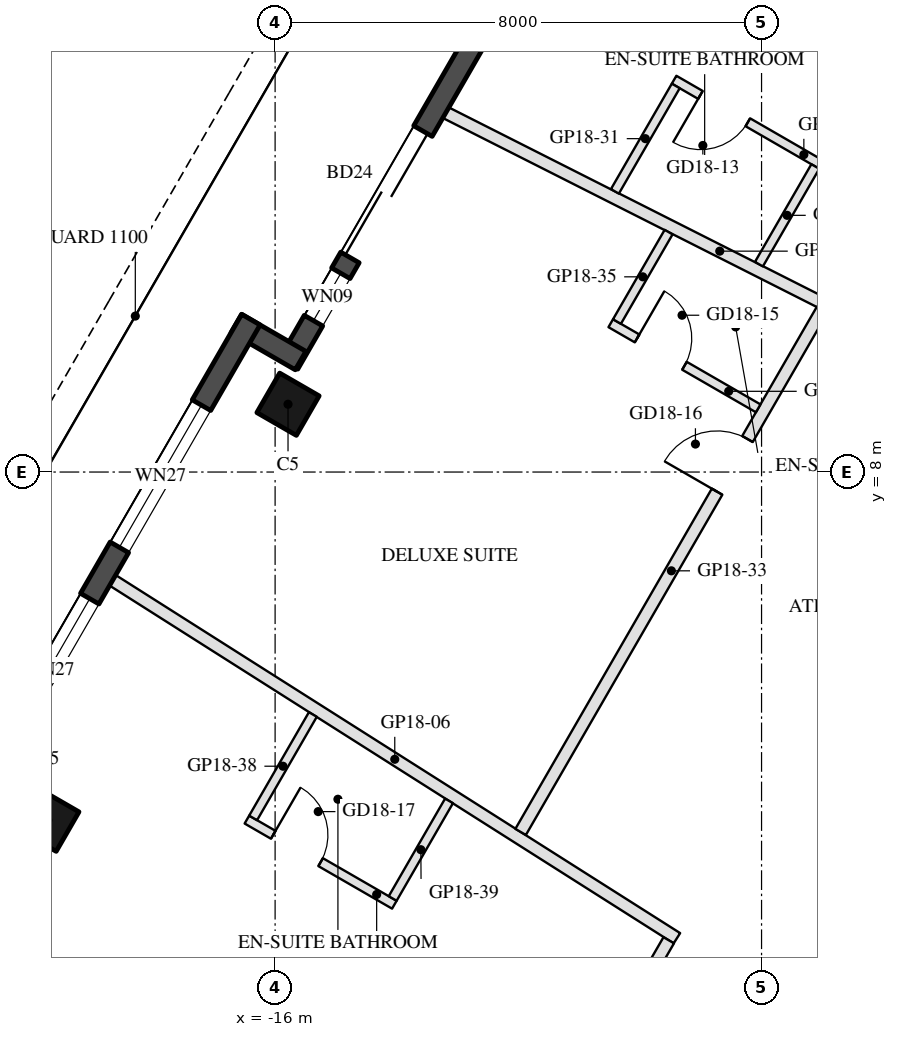
"""IFC4 building model, lengths in metres.
Left out: names, types, materials, properties, quantities, classifications, styles, units other than length and angle.
Written with IfcOpenShell. Run it as: python <this file> out.ifc"""

import sys

from ifc_helpers import new_model, si_unit, direction, frame, frame_2d, origin, origin_2d, place, context, subcontext, project, spatial, rectangle, hollow_rectangle, extrude, element, fill, save


model = new_model("IFC4")
c1 = context("Model", 3, precision=1e-05, world=origin(), true_north=direction((0.0, 1.0)))
c2 = subcontext(c1, "Body", "Model", "MODEL_VIEW")
j1 = project(units=[si_unit("LENGTHUNIT", "METRE"), si_unit("PLANEANGLEUNIT", "RADIAN")], contexts=[c1])
p1 = place(None, origin())
s1 = spatial("IfcSite", under=j1, at=p1, CompositionType="ELEMENT")
p2 = place(p1, origin())
s2 = spatial("IfcBuilding", under=s1, at=p2, CompositionType="ELEMENT")
p3 = place(p2, frame((0.0, 0.0, 194.7)))
s3 = spatial("IfcBuildingStorey", under=s2, at=p3, CompositionType="ELEMENT", Elevation=194.7)
for number, where, z_axis, x_axis in (
    (1, (-15.788, 9.115, 0.0), (0.0, 0.0, 1.0), (0.5, 0.866, 0.0)),
    (2, (-19.738, 2.273, 0.0), (0.0, 0.0, 1.0), (0.5, 0.866, 0.0)),
):
    element("IfcColumn", number, at=place(p3, frame(where, z_axis=z_axis, x_axis=x_axis)), inside=s3, PredefinedType="COLUMN", context=c2, shape_type="SweptSolid", body=[
        extrude(hollow_rectangle(XDim=0.75, YDim=0.75, WallThickness=0.035, at=origin_2d()), origin(), (0.0, 0.0, 1.0), 3.7),
    ])
p4 = place(p3, frame((-12.409, 15.617, 0.0), z_axis=(0.0, 0.0, 1.0), x_axis=(-0.500003597184, -0.866023326939, 0.0)))
e3 = element("IfcWall", 3, at=p4, inside=s3, PredefinedType="SOLIDWALL", context=c2, shape_type="SweptSolid", body=[
    extrude(rectangle(XDim=6.74, YDim=0.35, at=frame_2d((3.37, 0.0))), origin(), (0.0, 0.0, 1.0), 3.55),
])
p5 = place(p4, frame((2.32, 0.0, 0.0)))
e4 = element("IfcOpeningElement", 4, at=p5, cuts=e3, PredefinedType="OPENING", context=c2, shape_type="SweptSolid", body=[
    extrude(rectangle(XDim=2.4, YDim=2.4, at=frame_2d((1.2, 1.2))), frame((0.0, 0.185, 0.0), z_axis=(0.0, -1.0, 0.0), x_axis=(1.0, 0.0, 0.0)), (0.0, 0.0, 1.0), 0.37),
])
p6 = place(p4, frame((5.02, 0.0, 0.3)))
e5 = element("IfcOpeningElement", 5, at=p6, cuts=e3, PredefinedType="OPENING", context=c2, shape_type="SweptSolid", body=[
    extrude(rectangle(XDim=0.9, YDim=2.65, at=frame_2d((0.45, 1.325))), frame((0.0, 0.185, 0.0), z_axis=(0.0, -1.0, 0.0), x_axis=(1.0, 0.0, 0.0)), (0.0, 0.0, 1.0), 0.37),
])
p7 = place(p3, frame((-15.581, 9.833, 0.0), z_axis=(0.0, 0.0, 1.0), x_axis=(-0.866055662726, 0.499947586314, 0.0)))
e6 = element("IfcWall", 6, at=p7, inside=s3, PredefinedType="SOLIDWALL", context=c2, shape_type="SweptSolid", body=[
    extrude(rectangle(XDim=1.22, YDim=0.35, at=frame_2d((0.61, 0.0))), origin(), (0.0, 0.0, 1.0), 3.55),
])
p8 = place(p3, frame((-16.398, 10.507, 0.0), z_axis=(0.0, 0.0, 1.0), x_axis=(-0.499999142773, -0.866025898704, 0.0)))
e7 = element("IfcWall", 7, at=p8, inside=s3, PredefinedType="SOLIDWALL", context=c2, shape_type="SweptSolid", body=[
    extrude(rectangle(XDim=9.7, YDim=0.35, at=frame_2d((4.85, 0.0))), origin(), (0.0, 0.0, 1.0), 3.55),
])
p9 = place(p8, frame((1.625, 0.0, 0.3)))
e8 = element("IfcOpeningElement", 8, at=p9, cuts=e7, PredefinedType="OPENING", context=c2, shape_type="SweptSolid", body=[
    extrude(rectangle(XDim=2.7, YDim=2.65, at=frame_2d((1.35, 1.325))), frame((0.0, 0.185, 0.0), z_axis=(0.0, -1.0, 0.0), x_axis=(1.0, 0.0, 0.0)), (0.0, 0.0, 1.0), 0.37),
])
p10 = place(p8, frame((5.3, 0.0, 0.3)))
e9 = element("IfcOpeningElement", 9, at=p10, cuts=e7, PredefinedType="OPENING", context=c2, shape_type="SweptSolid", body=[
    extrude(rectangle(XDim=2.7, YDim=2.65, at=frame_2d((1.35, 1.325))), frame((0.0, 0.185, 0.0), z_axis=(0.0, -1.0, 0.0), x_axis=(1.0, 0.0, 0.0)), (0.0, 0.0, 1.0), 0.37),
])
p11 = place(p3, frame((-13.192, 13.91, 0.0), z_axis=(0.0, 0.0, 1.0), x_axis=(0.892469554868, -0.451107629766, 0.0)))
e10 = element("IfcWall", 10, at=p11, inside=s3, PredefinedType="PARTITIONING", context=c2, shape_type="SweptSolid", body=[
    extrude(rectangle(XDim=10.096, YDim=0.2, at=frame_2d((5.048, 0.0))), origin(), (0.0, 0.0, 1.0), 3.06),
])
p12 = place(p3, frame((-18.672, 6.219, 0.0), z_axis=(0.0, 0.0, 1.0), x_axis=(0.844423533478, -0.535676111198, 0.0)))
e11 = element("IfcWall", 11, at=p12, inside=s3, PredefinedType="PARTITIONING", context=c2, shape_type="SweptSolid", body=[
    extrude(rectangle(XDim=10.99, YDim=0.2, at=frame_2d((5.495, 0.0))), origin(), (0.0, 0.0, 1.0), 2.95),
])
p13 = place(p3, frame((-7.013, 13.052, 0.0), z_axis=(0.0, 0.0, 1.0), x_axis=(-0.866034573852, 0.49998411664, 0.0)))
e12 = element("IfcWall", 12, at=p13, inside=s3, PredefinedType="PARTITIONING", context=c2, shape_type="SweptSolid", body=[
    extrude(rectangle(XDim=2.8, YDim=0.15, at=frame_2d((1.4, 0.0))), origin(), (0.0, 0.0, 1.0), 2.95),
])
p14 = place(p13, frame((1.4, 0.0, 0.0)))
e13 = element("IfcOpeningElement", 13, at=p14, cuts=e12, PredefinedType="OPENING", context=c2, shape_type="SweptSolid", body=[
    extrude(rectangle(XDim=0.9, YDim=2.1, at=frame_2d((0.45, 1.05))), frame((0.0, 0.085, 0.0), z_axis=(0.0, -1.0, 0.0), x_axis=(1.0, 0.0, 0.0)), (0.0, 0.0, 1.0), 0.17),
])
p15 = place(p3, frame((-9.411, 14.35, 0.0), z_axis=(0.0, 0.0, 1.0), x_axis=(-0.499982900776, -0.866035275801, 0.0)))
e14 = element("IfcWall", 14, at=p15, inside=s3, PredefinedType="PARTITIONING", context=c2, shape_type="SweptSolid", body=[
    extrude(rectangle(XDim=2.001, YDim=0.15, at=frame_2d((1.001, 0.0))), origin(), (0.0, 0.0, 1.0), 3.55),
])
p16 = place(p3, frame((-7.116, 13.025, 0.0), z_axis=(0.0, 0.0, 1.0), x_axis=(-0.4999770169, -0.866038672677, 0.0)))
e15 = element("IfcWall", 15, at=p16, inside=s3, PredefinedType="PARTITIONING", context=c2, shape_type="SweptSolid", body=[
    extrude(rectangle(XDim=1.854, YDim=0.15, at=frame_2d((0.927, 0.0))), origin(), (0.0, 0.0, 1.0), 3.55),
])
p17 = place(p3, frame((-11.962, 2.081, 0.0), z_axis=(0.0, 0.0, 1.0), x_axis=(0.500007290723, 0.866021194443, 0.0)))
e16 = element("IfcWall", 16, at=p17, inside=s3, PredefinedType="PARTITIONING", context=c2, shape_type="SweptSolid", body=[
    extrude(rectangle(XDim=9.917, YDim=0.2, at=frame_2d((4.958, 0.0))), origin(), (0.0, 0.0, 1.0), 2.95),
])
p18 = place(p17, frame((6.462, 0.0, 0.0)))
e17 = element("IfcOpeningElement", 17, at=p18, cuts=e16, PredefinedType="OPENING", context=c2, shape_type="SweptSolid", body=[
    extrude(rectangle(XDim=1.0, YDim=2.1, at=frame_2d((0.5, 1.05))), frame((0.0, 0.11, 0.0), z_axis=(0.0, -1.0, 0.0), x_axis=(1.0, 0.0, 0.0)), (0.0, 0.0, 1.0), 0.22),
])
p19 = place(p3, frame((-10.48, 10.448, 0.0), z_axis=(0.0, 0.0, 1.0), x_axis=(0.865996816683, -0.500049511043, 0.0)))
e18 = element("IfcWall", 18, at=p19, inside=s3, PredefinedType="PARTITIONING", context=c2, shape_type="SweptSolid", body=[
    extrude(rectangle(XDim=2.8, YDim=0.15, at=frame_2d((1.4, 0.0))), origin(), (0.0, 0.0, 1.0), 2.95),
])
p20 = place(p19, frame((0.5, 0.0, 0.0)))
e19 = element("IfcOpeningElement", 19, at=p20, cuts=e18, PredefinedType="OPENING", context=c2, shape_type="SweptSolid", body=[
    extrude(rectangle(XDim=0.9, YDim=2.1, at=frame_2d((0.45, 1.05))), frame((0.0, 0.085, 0.0), z_axis=(0.0, -1.0, 0.0), x_axis=(1.0, 0.0, 0.0)), (0.0, 0.0, 1.0), 0.17),
])
p21 = place(p3, frame((-9.529, 11.946, 0.0), z_axis=(0.0, 0.0, 1.0), x_axis=(-0.499942281444, -0.866058725044, 0.0)))
e20 = element("IfcWall", 20, at=p21, inside=s3, PredefinedType="PARTITIONING", context=c2, shape_type="SweptSolid", body=[
    extrude(rectangle(XDim=1.698, YDim=0.15, at=frame_2d((0.849, 0.0))), origin(), (0.0, 0.0, 1.0), 2.95),
])
p22 = place(p3, frame((-12.269, -4.45, 0.0), z_axis=(0.0, 0.0, 1.0), x_axis=(0.500026884667, 0.866009881359, 0.0)))
e21 = element("IfcWall", 21, at=p22, inside=s3, PredefinedType="PARTITIONING", context=c2, shape_type="SweptSolid", body=[
    extrude(rectangle(XDim=5.484, YDim=0.2, at=frame_2d((2.742, 0.0))), origin(), (0.0, 0.0, 1.0), 2.95),
])
p23 = place(p22, frame((2.242, 0.0, 0.0)))
e22 = element("IfcOpeningElement", 22, at=p23, cuts=e21, PredefinedType="OPENING", context=c2, shape_type="SweptSolid", body=[
    extrude(rectangle(XDim=1.0, YDim=2.1, at=frame_2d((0.5, 1.05))), frame((0.0, 0.11, 0.0), z_axis=(0.0, -1.0, 0.0), x_axis=(1.0, 0.0, 0.0)), (0.0, 0.0, 1.0), 0.22),
])
p24 = place(p3, frame((-16.464, 2.284, 0.0), z_axis=(0.0, 0.0, 1.0), x_axis=(0.866018616679, -0.500011755427, 0.0)))
e23 = element("IfcWall", 23, at=p24, inside=s3, PredefinedType="PARTITIONING", context=c2, shape_type="SweptSolid", body=[
    extrude(rectangle(XDim=2.8, YDim=0.15, at=frame_2d((1.4, 0.0))), origin(), (0.0, 0.0, 1.0), 3.55),
])
p25 = place(p24, frame((0.5, 0.0, 0.0)))
e24 = element("IfcOpeningElement", 24, at=p25, cuts=e23, PredefinedType="OPENING", context=c2, shape_type="SweptSolid", body=[
    extrude(rectangle(XDim=0.9, YDim=2.1, at=frame_2d((0.45, 1.05))), frame((0.0, 0.085, 0.0), z_axis=(0.0, -1.0, 0.0), x_axis=(1.0, 0.0, 0.0)), (0.0, 0.0, 1.0), 0.17),
])
p26 = place(p3, frame((-15.379, 4.012, 0.0), z_axis=(0.0, 0.0, 1.0), x_axis=(-0.500016598995, -0.866015820138, 0.0)))
e25 = element("IfcWall", 25, at=p26, inside=s3, PredefinedType="PARTITIONING", context=c2, shape_type="SweptSolid", body=[
    extrude(rectangle(XDim=1.964, YDim=0.15, at=frame_2d((0.982, 0.0))), origin(), (0.0, 0.0, 1.0), 3.55),
])
p27 = place(p3, frame((-13.14, 2.591, 0.0), z_axis=(0.0, 0.0, 1.0), x_axis=(-0.499950530793, -0.86605396296, 0.0)))
e26 = element("IfcWall", 26, at=p27, inside=s3, PredefinedType="PARTITIONING", context=c2, shape_type="SweptSolid", body=[
    extrude(rectangle(XDim=1.853, YDim=0.15, at=frame_2d((0.927, 0.0))), origin(), (0.0, 0.0, 1.0), 3.55),
])
p28 = place(p5, frame((2.4, 0.0, 0.0), z_axis=(0.0, 0.0, 1.0), x_axis=(-1.0, 0.0, 0.0)))
e27 = element("IfcDoor", 27, at=p28, inside=s3, OperationType="SLIDING_TO_LEFT", PredefinedType="DOOR", context=c2, shape_type="SweptSolid", body=[
    extrude(rectangle(XDim=2.4, YDim=2.4, at=frame_2d((1.2, 1.2))), frame((0.0, 0.025, 0.0), z_axis=(0.0, -1.0, 0.0), x_axis=(1.0, 0.0, 0.0)), (0.0, 0.0, 1.0), 0.05),
])
fill(e4, e27)
p29 = place(p6, origin())
e28 = element("IfcWindow", 28, at=p29, inside=s3, PartitioningType="SINGLE_PANEL", PredefinedType="WINDOW", context=c2, shape_type="SweptSolid", body=[
    extrude(rectangle(XDim=0.9, YDim=2.65, at=frame_2d((0.45, 1.325))), frame((0.0, 0.03, 0.0), z_axis=(0.0, -1.0, 0.0), x_axis=(1.0, 0.0, 0.0)), (0.0, 0.0, 1.0), 0.06),
])
fill(e5, e28)
p30 = place(p9, origin())
e29 = element("IfcWindow", 29, at=p30, inside=s3, PartitioningType="SINGLE_PANEL", PredefinedType="WINDOW", context=c2, shape_type="SweptSolid", body=[
    extrude(rectangle(XDim=2.7, YDim=2.65, at=frame_2d((1.35, 1.325))), frame((0.0, 0.03, 0.0), z_axis=(0.0, -1.0, 0.0), x_axis=(1.0, 0.0, 0.0)), (0.0, 0.0, 1.0), 0.06),
])
fill(e8, e29)
p31 = place(p10, origin())
e30 = element("IfcWindow", 30, at=p31, inside=s3, PartitioningType="SINGLE_PANEL", PredefinedType="WINDOW", context=c2, shape_type="SweptSolid", body=[
    extrude(rectangle(XDim=2.7, YDim=2.65, at=frame_2d((1.35, 1.325))), frame((0.0, 0.03, 0.0), z_axis=(0.0, -1.0, 0.0), x_axis=(1.0, 0.0, 0.0)), (0.0, 0.0, 1.0), 0.06),
])
fill(e9, e30)
p32 = place(p14, origin())
e31 = element("IfcDoor", 31, at=p32, inside=s3, OperationType="SINGLE_SWING_RIGHT", PredefinedType="DOOR", context=c2, shape_type="SweptSolid", body=[
    extrude(rectangle(XDim=0.9, YDim=2.1, at=frame_2d((0.45, 1.05))), frame((0.0, 0.025, 0.0), z_axis=(0.0, -1.0, 0.0), x_axis=(1.0, 0.0, 0.0)), (0.0, 0.0, 1.0), 0.05),
])
fill(e13, e31)
p33 = place(p20, origin())
e32 = element("IfcDoor", 32, at=p33, inside=s3, OperationType="SINGLE_SWING_LEFT", PredefinedType="DOOR", context=c2, shape_type="SweptSolid", body=[
    extrude(rectangle(XDim=0.9, YDim=2.1, at=frame_2d((0.45, 1.05))), frame((0.0, 0.025, 0.0), z_axis=(0.0, -1.0, 0.0), x_axis=(1.0, 0.0, 0.0)), (0.0, 0.0, 1.0), 0.05),
])
fill(e19, e32)
p34 = place(p18, origin())
e33 = element("IfcDoor", 33, at=p34, inside=s3, OperationType="SINGLE_SWING_LEFT", PredefinedType="DOOR", context=c2, shape_type="SweptSolid", body=[
    extrude(rectangle(XDim=1.0, YDim=2.1, at=frame_2d((0.5, 1.05))), frame((0.0, 0.025, 0.0), z_axis=(0.0, -1.0, 0.0), x_axis=(1.0, 0.0, 0.0)), (0.0, 0.0, 1.0), 0.05),
])
fill(e17, e33)
p35 = place(p25, origin())
e34 = element("IfcDoor", 34, at=p35, inside=s3, OperationType="SINGLE_SWING_LEFT", PredefinedType="DOOR", context=c2, shape_type="SweptSolid", body=[
    extrude(rectangle(XDim=0.9, YDim=2.1, at=frame_2d((0.45, 1.05))), frame((0.0, 0.025, 0.0), z_axis=(0.0, -1.0, 0.0), x_axis=(1.0, 0.0, 0.0)), (0.0, 0.0, 1.0), 0.05),
])
fill(e24, e34)
save(model, sys.argv[1])
